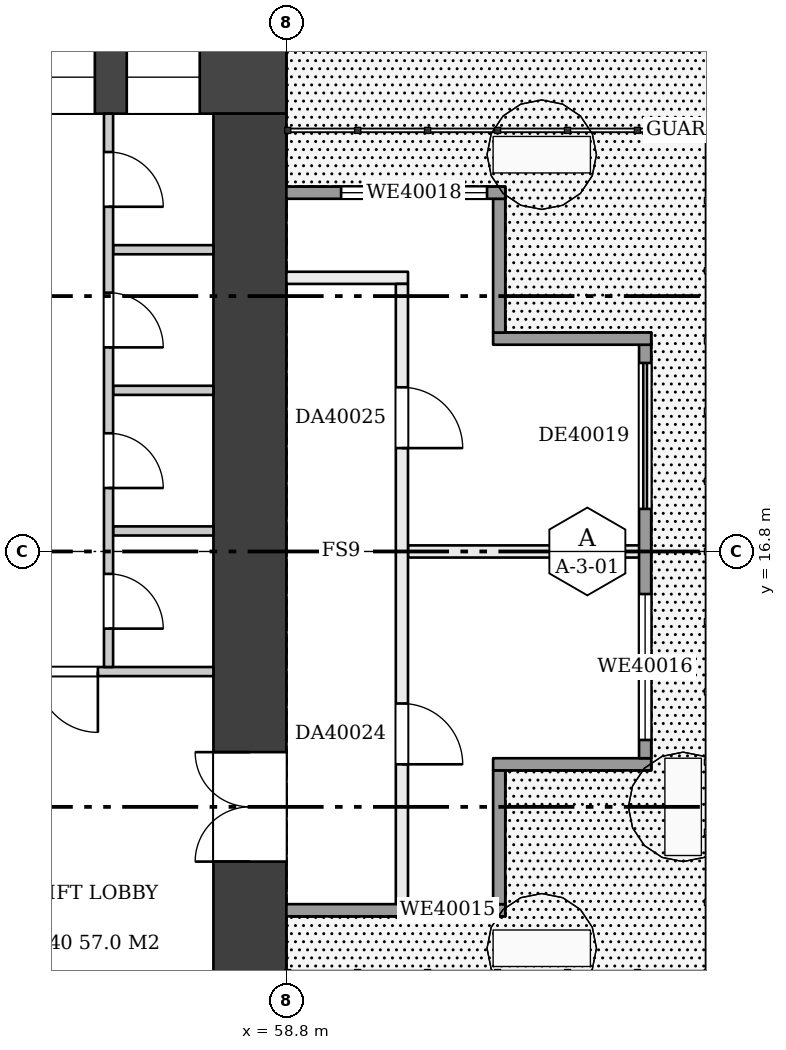
"""IFC4 building model, lengths in metres.
Left out: names, types, materials, properties, quantities, classifications, styles, units other than length and angle.
Written with IfcOpenShell. Run it as: python <this file> out.ifc"""

import sys

from ifc_helpers import new_model, si_unit, direction, frame, frame_2d, origin, place, context, subcontext, project, spatial, rectangle, extrude, element, fill, save


model = new_model("IFC4")
c1 = context("Model", 3, precision=1e-05, world=origin(), true_north=direction((0.0, 1.0)))
c2 = subcontext(c1, "Body", "Model", "MODEL_VIEW")
j1 = project(units=[si_unit("LENGTHUNIT", "METRE"), si_unit("PLANEANGLEUNIT", "RADIAN")], contexts=[c1])
p1 = place(None, origin())
s1 = spatial("IfcSite", under=j1, at=p1, CompositionType="ELEMENT")
p2 = place(p1, origin())
s2 = spatial("IfcBuilding", under=s1, at=p2, CompositionType="ELEMENT")
p3 = place(p2, frame((0.0, 0.0, 158.2)))
s3 = spatial("IfcBuildingStorey", under=s2, at=p3, CompositionType="ELEMENT", Elevation=158.2)
p4 = place(p3, frame((42.0, 24.6, 0.0), z_axis=(0.0, 0.0, 1.0), x_axis=(1.0, 0.0, 0.0)))
e1 = element("IfcWall", 1, at=p4, inside=s3, PredefinedType="SHEAR", context=c2, shape_type="SweptSolid", body=[
    extrude(rectangle(XDim=16.8, YDim=1.2, at=frame_2d((8.4, 0.0))), origin(), (0.0, 0.0, 1.0), 3.22),
])
p5 = place(p4, frame((1.8, 0.0, 0.5)))
e2 = element("IfcOpeningElement", 2, at=p5, cuts=e1, PredefinedType="OPENING", context=c2, shape_type="SweptSolid", body=[
    extrude(rectangle(XDim=1.8, YDim=2.4, at=frame_2d((0.9, 1.2))), frame((0.0, 0.61, 0.0), z_axis=(0.0, -1.0, 0.0), x_axis=(1.0, 0.0, 0.0)), (0.0, 0.0, 1.0), 1.22),
])
p6 = place(p4, frame((4.49, 0.0, 1.6)))
e3 = element("IfcOpeningElement", 3, at=p6, cuts=e1, PredefinedType="OPENING", context=c2, shape_type="SweptSolid", body=[
    extrude(rectangle(XDim=0.9, YDim=1.2, at=frame_2d((0.45, 0.6))), frame((0.0, 0.61, 0.0), z_axis=(0.0, -1.0, 0.0), x_axis=(1.0, 0.0, 0.0)), (0.0, 0.0, 1.0), 1.22),
])
p7 = place(p4, frame((5.71, 0.0, 1.6)))
e4 = element("IfcOpeningElement", 4, at=p7, cuts=e1, PredefinedType="OPENING", context=c2, shape_type="SweptSolid", body=[
    extrude(rectangle(XDim=1.1, YDim=1.2, at=frame_2d((0.55, 0.6))), frame((0.0, 0.61, 0.0), z_axis=(0.0, -1.0, 0.0), x_axis=(1.0, 0.0, 0.0)), (0.0, 0.0, 1.0), 1.22),
])
p8 = place(p4, frame((7.15, 0.0, 1.6)))
e5 = element("IfcOpeningElement", 5, at=p8, cuts=e1, PredefinedType="OPENING", context=c2, shape_type="SweptSolid", body=[
    extrude(rectangle(XDim=1.1, YDim=1.2, at=frame_2d((0.55, 0.6))), frame((0.0, 0.61, 0.0), z_axis=(0.0, -1.0, 0.0), x_axis=(1.0, 0.0, 0.0)), (0.0, 0.0, 1.0), 1.22),
])
p9 = place(p4, frame((12.65, 0.0, 0.6)))
e6 = element("IfcOpeningElement", 6, at=p9, cuts=e1, PredefinedType="OPENING", context=c2, shape_type="SweptSolid", body=[
    extrude(rectangle(XDim=1.0, YDim=2.1, at=frame_2d((0.5, 1.05))), frame((0.0, 0.61, 0.0), z_axis=(0.0, -1.0, 0.0), x_axis=(1.0, 0.0, 0.0)), (0.0, 0.0, 1.0), 1.22),
])
p10 = place(p4, frame((14.175, 0.0, 1.6)))
e7 = element("IfcOpeningElement", 7, at=p10, cuts=e1, PredefinedType="OPENING", context=c2, shape_type="SweptSolid", body=[
    extrude(rectangle(XDim=1.2, YDim=1.2, at=frame_2d((0.6, 0.6))), frame((0.0, 0.61, 0.0), z_axis=(0.0, -1.0, 0.0), x_axis=(1.0, 0.0, 0.0)), (0.0, 0.0, 1.0), 1.22),
])
p11 = place(p3, frame((58.2, 9.6, 0.0), z_axis=(0.0, 0.0, 1.0), x_axis=(0.0, 1.0, 0.0)))
e8 = element("IfcWall", 8, at=p11, inside=s3, PredefinedType="SHEAR", context=c2, shape_type="SweptSolid", body=[
    extrude(rectangle(XDim=14.4, YDim=1.2, at=frame_2d((7.2, 0.0))), origin(), (0.0, 0.0, 1.0), 3.22),
])
p12 = place(p11, frame((2.1, 0.0, 0.0)))
e9 = element("IfcOpeningElement", 9, at=p12, cuts=e8, PredefinedType="OPENING", context=c2, shape_type="SweptSolid", body=[
    extrude(rectangle(XDim=1.8, YDim=2.1, at=frame_2d((0.9, 1.05))), frame((0.0, 0.61, 0.0), z_axis=(0.0, -1.0, 0.0), x_axis=(1.0, 0.0, 0.0)), (0.0, 0.0, 1.0), 1.22),
])
p13 = place(p3, frame((54.6, 14.825, 0.0), z_axis=(0.0, 0.0, 1.0), x_axis=(1.0, 0.0, 0.0)))
e10 = element("IfcWall", 10, at=p13, inside=s3, PredefinedType="PARTITIONING", context=c2, shape_type="SweptSolid", body=[
    extrude(rectangle(XDim=3.0, YDim=0.15, at=frame_2d((1.5, 0.0))), origin(), (0.0, 0.0, 1.0), 3.22),
])
p14 = place(p13, frame((0.1, 0.0, 0.0)))
e11 = element("IfcOpeningElement", 11, at=p14, cuts=e10, PredefinedType="OPENING", context=c2, shape_type="SweptSolid", body=[
    extrude(rectangle(XDim=1.0, YDim=2.1, at=frame_2d((0.5, 1.05))), frame((0.0, 0.085, 0.0), z_axis=(0.0, -1.0, 0.0), x_axis=(1.0, 0.0, 0.0)), (0.0, 0.0, 1.0), 0.17),
])
for number, where, z_axis, x_axis in (
    (12, (55.95, 17.137, 0.0), (0.0, 0.0, 1.0), (1.0, 0.0, 0.0)),
    (13, (55.95, 19.45, 0.0), (0.0, 0.0, 1.0), (1.0, 0.0, 0.0)),
    (14, (55.95, 21.762, 0.0), (0.0, 0.0, 1.0), (1.0, 0.0, 0.0)),
):
    element("IfcWall", number, at=place(p3, frame(where, z_axis=z_axis, x_axis=x_axis)), inside=s3, PredefinedType="PARTITIONING", context=c2, shape_type="SweptSolid", body=[
        extrude(rectangle(XDim=1.65, YDim=0.15, at=frame_2d((0.825, 0.0))), origin(), (0.0, 0.0, 1.0), 3.22),
    ])
p15 = place(p3, frame((55.875, 14.9, 0.0), z_axis=(0.0, 0.0, 1.0), x_axis=(0.0, 1.0, 0.0)))
e15 = element("IfcWall", 15, at=p15, inside=s3, PredefinedType="PARTITIONING", context=c2, shape_type="SweptSolid", body=[
    extrude(rectangle(XDim=9.1, YDim=0.15, at=frame_2d((4.55, 0.0))), origin(), (0.0, 0.0, 1.0), 3.22),
])
p16 = place(p15, frame((0.631, 0.0, 0.0)))
e16 = element("IfcOpeningElement", 16, at=p16, cuts=e15, PredefinedType="OPENING", context=c2, shape_type="SweptSolid", body=[
    extrude(rectangle(XDim=0.9, YDim=2.1, at=frame_2d((0.45, 1.05))), frame((0.0, 0.085, 0.0), z_axis=(0.0, -1.0, 0.0), x_axis=(1.0, 0.0, 0.0)), (0.0, 0.0, 1.0), 0.17),
])
p17 = place(p15, frame((2.944, 0.0, 0.0)))
e17 = element("IfcOpeningElement", 17, at=p17, cuts=e15, PredefinedType="OPENING", context=c2, shape_type="SweptSolid", body=[
    extrude(rectangle(XDim=0.9, YDim=2.1, at=frame_2d((0.45, 1.05))), frame((0.0, 0.085, 0.0), z_axis=(0.0, -1.0, 0.0), x_axis=(1.0, 0.0, 0.0)), (0.0, 0.0, 1.0), 0.17),
])
p18 = place(p15, frame((5.256, 0.0, 0.0)))
e18 = element("IfcOpeningElement", 18, at=p18, cuts=e15, PredefinedType="OPENING", context=c2, shape_type="SweptSolid", body=[
    extrude(rectangle(XDim=0.9, YDim=2.1, at=frame_2d((0.45, 1.05))), frame((0.0, 0.085, 0.0), z_axis=(0.0, -1.0, 0.0), x_axis=(1.0, 0.0, 0.0)), (0.0, 0.0, 1.0), 0.17),
])
p19 = place(p15, frame((7.569, 0.0, 0.0)))
e19 = element("IfcOpeningElement", 19, at=p19, cuts=e15, PredefinedType="OPENING", context=c2, shape_type="SweptSolid", body=[
    extrude(rectangle(XDim=0.9, YDim=2.1, at=frame_2d((0.45, 1.05))), frame((0.0, 0.085, 0.0), z_axis=(0.0, -1.0, 0.0), x_axis=(1.0, 0.0, 0.0)), (0.0, 0.0, 1.0), 0.17),
])
p20 = place(p3, frame((60.8, 16.8, 0.0), z_axis=(0.0, 0.0, 1.0), x_axis=(1.0, 0.0, 0.0)))
e20 = element("IfcWall", 20, at=p20, inside=s3, PredefinedType="PARTITIONING", context=c2, shape_type="SweptSolid", body=[
    extrude(rectangle(XDim=3.9, YDim=0.2, at=frame_2d((1.95, 0.0))), origin(), (0.0, 0.0, 1.0), 3.22),
])
p21 = place(p3, frame((58.8, 21.3, 0.0), z_axis=(0.0, 0.0, 1.0), x_axis=(1.0, 0.0, 0.0)))
e21 = element("IfcWall", 21, at=p21, inside=s3, PredefinedType="PARTITIONING", context=c2, shape_type="SweptSolid", body=[
    extrude(rectangle(XDim=2.0, YDim=0.2, at=frame_2d((1.0, 0.0))), origin(), (0.0, 0.0, 1.0), 3.22),
])
p22 = place(p3, frame((60.7, 10.9, 0.0), z_axis=(0.0, 0.0, 1.0), x_axis=(0.0, 1.0, 0.0)))
e22 = element("IfcWall", 22, at=p22, inside=s3, PredefinedType="PARTITIONING", context=c2, shape_type="SweptSolid", body=[
    extrude(rectangle(XDim=10.3, YDim=0.2, at=frame_2d((5.15, 0.0))), origin(), (0.0, 0.0, 1.0), 3.22),
])
p23 = place(p22, frame((2.4, 0.0, 0.0)))
e23 = element("IfcOpeningElement", 23, at=p23, cuts=e22, PredefinedType="OPENING", context=c2, shape_type="SweptSolid", body=[
    extrude(rectangle(XDim=1.0, YDim=2.1, at=frame_2d((0.5, 1.05))), frame((0.0, 0.11, 0.0), z_axis=(0.0, -1.0, 0.0), x_axis=(1.0, 0.0, 0.0)), (0.0, 0.0, 1.0), 0.22),
])
p24 = place(p22, frame((7.6, 0.0, 0.0)))
e24 = element("IfcOpeningElement", 24, at=p24, cuts=e22, PredefinedType="OPENING", context=c2, shape_type="SweptSolid", body=[
    extrude(rectangle(XDim=1.0, YDim=2.1, at=frame_2d((0.5, 1.05))), frame((0.0, 0.11, 0.0), z_axis=(0.0, -1.0, 0.0), x_axis=(1.0, 0.0, 0.0)), (0.0, 0.0, 1.0), 0.22),
])
p25 = place(p3, frame((58.8, 10.9, 0.0), z_axis=(0.0, 0.0, 1.0), x_axis=(1.0, 0.0, 0.0)))
e25 = element("IfcWall", 25, at=p25, inside=s3, PredefinedType="SOLIDWALL", context=c2, shape_type="SweptSolid", body=[
    extrude(rectangle(XDim=3.6, YDim=0.2, at=frame_2d((1.8, 0.0))), origin(), (0.0, 0.0, 1.0), 3.22),
])
p26 = place(p25, frame((2.0, 0.0, 0.9)))
e26 = element("IfcOpeningElement", 26, at=p26, cuts=e25, PredefinedType="OPENING", context=c2, shape_type="SweptSolid", body=[
    extrude(rectangle(XDim=1.3, YDim=1.5, at=frame_2d((0.65, 0.75))), frame((0.0, 0.11, 0.0), z_axis=(0.0, -1.0, 0.0), x_axis=(1.0, 0.0, 0.0)), (0.0, 0.0, 1.0), 0.22),
])
p27 = place(p3, frame((62.3, 11.0, 0.0), z_axis=(0.0, 0.0, 1.0), x_axis=(0.0, 1.0, 0.0)))
e27 = element("IfcWall", 27, at=p27, inside=s3, PredefinedType="SOLIDWALL", context=c2, shape_type="SweptSolid", body=[
    extrude(rectangle(XDim=2.2, YDim=0.2, at=frame_2d((1.1, 0.0))), origin(), (0.0, 0.0, 1.0), 3.22),
])
p28 = place(p3, frame((62.2, 13.3, 0.0), z_axis=(0.0, 0.0, 1.0), x_axis=(1.0, 0.0, 0.0)))
e28 = element("IfcWall", 28, at=p28, inside=s3, PredefinedType="SOLIDWALL", context=c2, shape_type="SweptSolid", body=[
    extrude(rectangle(XDim=2.6, YDim=0.2, at=frame_2d((1.3, 0.0))), origin(), (0.0, 0.0, 1.0), 3.22),
])
p29 = place(p3, frame((64.7, 13.4, 0.0), z_axis=(0.0, 0.0, 1.0), x_axis=(0.0, 1.0, 0.0)))
e29 = element("IfcWall", 29, at=p29, inside=s3, PredefinedType="SOLIDWALL", context=c2, shape_type="SweptSolid", body=[
    extrude(rectangle(XDim=6.8, YDim=0.2, at=frame_2d((3.4, 0.0))), origin(), (0.0, 0.0, 1.0), 3.22),
])
p30 = place(p29, frame((0.3, 0.0, 0.9)))
e30 = element("IfcOpeningElement", 30, at=p30, cuts=e29, PredefinedType="OPENING", context=c2, shape_type="SweptSolid", body=[
    extrude(rectangle(XDim=2.4, YDim=1.5, at=frame_2d((1.2, 0.75))), frame((0.0, 0.11, 0.0), z_axis=(0.0, -1.0, 0.0), x_axis=(1.0, 0.0, 0.0)), (0.0, 0.0, 1.0), 0.22),
])
p31 = place(p29, frame((4.1, 0.0, 0.0)))
e31 = element("IfcOpeningElement", 31, at=p31, cuts=e29, PredefinedType="OPENING", context=c2, shape_type="SweptSolid", body=[
    extrude(rectangle(XDim=2.4, YDim=2.2, at=frame_2d((1.2, 1.1))), frame((0.0, 0.11, 0.0), z_axis=(0.0, -1.0, 0.0), x_axis=(1.0, 0.0, 0.0)), (0.0, 0.0, 1.0), 0.22),
])
p32 = place(p3, frame((64.8, 20.3, 0.0), z_axis=(0.0, 0.0, 1.0), x_axis=(-1.0, 0.0, 0.0)))
e32 = element("IfcWall", 32, at=p32, inside=s3, PredefinedType="SOLIDWALL", context=c2, shape_type="SweptSolid", body=[
    extrude(rectangle(XDim=2.6, YDim=0.2, at=frame_2d((1.3, 0.0))), origin(), (0.0, 0.0, 1.0), 3.22),
])
p33 = place(p3, frame((62.3, 20.4, 0.0), z_axis=(0.0, 0.0, 1.0), x_axis=(0.0, 1.0, 0.0)))
e33 = element("IfcWall", 33, at=p33, inside=s3, PredefinedType="SOLIDWALL", context=c2, shape_type="SweptSolid", body=[
    extrude(rectangle(XDim=2.2, YDim=0.2, at=frame_2d((1.1, 0.0))), origin(), (0.0, 0.0, 1.0), 3.22),
])
p34 = place(p3, frame((62.4, 22.7, 0.0), z_axis=(0.0, 0.0, 1.0), x_axis=(-1.0, 0.0, 0.0)))
e34 = element("IfcWall", 34, at=p34, inside=s3, PredefinedType="SOLIDWALL", context=c2, shape_type="SweptSolid", body=[
    extrude(rectangle(XDim=3.6, YDim=0.2, at=frame_2d((1.8, 0.0))), origin(), (0.0, 0.0, 1.0), 3.22),
])
p35 = place(p34, frame((0.3, 0.0, 0.9)))
e35 = element("IfcOpeningElement", 35, at=p35, cuts=e34, PredefinedType="OPENING", context=c2, shape_type="SweptSolid", body=[
    extrude(rectangle(XDim=2.4, YDim=1.5, at=frame_2d((1.2, 0.75))), frame((0.0, 0.11, 0.0), z_axis=(0.0, -1.0, 0.0), x_axis=(1.0, 0.0, 0.0)), (0.0, 0.0, 1.0), 0.22),
])
p36 = place(p12, origin())
e36 = element("IfcDoor", 36, at=p36, inside=s3, OperationType="DOUBLE_DOOR_SINGLE_SWING", PredefinedType="DOOR", context=c2, shape_type="SweptSolid", body=[
    extrude(rectangle(XDim=1.8, YDim=2.1, at=frame_2d((0.9, 1.05))), frame((0.0, 0.025, 0.0), z_axis=(0.0, -1.0, 0.0), x_axis=(1.0, 0.0, 0.0)), (0.0, 0.0, 1.0), 0.05),
])
fill(e9, e36)
p37 = place(p14, frame((1.0, 0.0, 0.0), z_axis=(0.0, 0.0, 1.0), x_axis=(-1.0, 0.0, 0.0)))
e37 = element("IfcDoor", 37, at=p37, inside=s3, OperationType="SINGLE_SWING_LEFT", PredefinedType="DOOR", context=c2, shape_type="SweptSolid", body=[
    extrude(rectangle(XDim=1.0, YDim=2.1, at=frame_2d((0.5, 1.05))), frame((0.0, 0.025, 0.0), z_axis=(0.0, -1.0, 0.0), x_axis=(1.0, 0.0, 0.0)), (0.0, 0.0, 1.0), 0.05),
])
fill(e11, e37)
p38 = place(p16, frame((0.9, 0.0, 0.0), z_axis=(0.0, 0.0, 1.0), x_axis=(-1.0, 0.0, 0.0)))
e38 = element("IfcDoor", 38, at=p38, inside=s3, OperationType="SINGLE_SWING_RIGHT", PredefinedType="DOOR", context=c2, shape_type="SweptSolid", body=[
    extrude(rectangle(XDim=0.9, YDim=2.1, at=frame_2d((0.45, 1.05))), frame((0.0, 0.025, 0.0), z_axis=(0.0, -1.0, 0.0), x_axis=(1.0, 0.0, 0.0)), (0.0, 0.0, 1.0), 0.05),
])
fill(e16, e38)
p39 = place(p17, frame((0.9, 0.0, 0.0), z_axis=(0.0, 0.0, 1.0), x_axis=(-1.0, 0.0, 0.0)))
e39 = element("IfcDoor", 39, at=p39, inside=s3, OperationType="SINGLE_SWING_RIGHT", PredefinedType="DOOR", context=c2, shape_type="SweptSolid", body=[
    extrude(rectangle(XDim=0.9, YDim=2.1, at=frame_2d((0.45, 1.05))), frame((0.0, 0.025, 0.0), z_axis=(0.0, -1.0, 0.0), x_axis=(1.0, 0.0, 0.0)), (0.0, 0.0, 1.0), 0.05),
])
fill(e17, e39)
p40 = place(p18, frame((0.9, 0.0, 0.0), z_axis=(0.0, 0.0, 1.0), x_axis=(-1.0, 0.0, 0.0)))
e40 = element("IfcDoor", 40, at=p40, inside=s3, OperationType="SINGLE_SWING_RIGHT", PredefinedType="DOOR", context=c2, shape_type="SweptSolid", body=[
    extrude(rectangle(XDim=0.9, YDim=2.1, at=frame_2d((0.45, 1.05))), frame((0.0, 0.025, 0.0), z_axis=(0.0, -1.0, 0.0), x_axis=(1.0, 0.0, 0.0)), (0.0, 0.0, 1.0), 0.05),
])
fill(e18, e40)
p41 = place(p19, frame((0.9, 0.0, 0.0), z_axis=(0.0, 0.0, 1.0), x_axis=(-1.0, 0.0, 0.0)))
e41 = element("IfcDoor", 41, at=p41, inside=s3, OperationType="SINGLE_SWING_RIGHT", PredefinedType="DOOR", context=c2, shape_type="SweptSolid", body=[
    extrude(rectangle(XDim=0.9, YDim=2.1, at=frame_2d((0.45, 1.05))), frame((0.0, 0.025, 0.0), z_axis=(0.0, -1.0, 0.0), x_axis=(1.0, 0.0, 0.0)), (0.0, 0.0, 1.0), 0.05),
])
fill(e19, e41)
p42 = place(p9, origin())
e42 = element("IfcWindow", 42, at=p42, inside=s3, PartitioningType="SINGLE_PANEL", PredefinedType="WINDOW", context=c2, shape_type="SweptSolid", body=[
    extrude(rectangle(XDim=1.0, YDim=2.1, at=frame_2d((0.5, 1.05))), frame((0.0, 0.03, 0.0), z_axis=(0.0, -1.0, 0.0), x_axis=(1.0, 0.0, 0.0)), (0.0, 0.0, 1.0), 0.06),
])
fill(e6, e42)
p43 = place(p10, origin())
e43 = element("IfcWindow", 43, at=p43, inside=s3, PartitioningType="SINGLE_PANEL", PredefinedType="WINDOW", context=c2, shape_type="SweptSolid", body=[
    extrude(rectangle(XDim=1.2, YDim=1.2, at=frame_2d((0.6, 0.6))), frame((0.0, 0.03, 0.0), z_axis=(0.0, -1.0, 0.0), x_axis=(1.0, 0.0, 0.0)), (0.0, 0.0, 1.0), 0.06),
])
fill(e7, e43)
p44 = place(p23, frame((1.0, 0.0, 0.0), z_axis=(0.0, 0.0, 1.0), x_axis=(-1.0, 0.0, 0.0)))
e44 = element("IfcDoor", 44, at=p44, inside=s3, OperationType="SINGLE_SWING_RIGHT", PredefinedType="DOOR", context=c2, shape_type="SweptSolid", body=[
    extrude(rectangle(XDim=1.0, YDim=2.1, at=frame_2d((0.5, 1.05))), frame((0.0, 0.025, 0.0), z_axis=(0.0, -1.0, 0.0), x_axis=(1.0, 0.0, 0.0)), (0.0, 0.0, 1.0), 0.05),
])
fill(e23, e44)
p45 = place(p24, frame((1.0, 0.0, 0.0), z_axis=(0.0, 0.0, 1.0), x_axis=(-1.0, 0.0, 0.0)))
e45 = element("IfcDoor", 45, at=p45, inside=s3, OperationType="SINGLE_SWING_RIGHT", PredefinedType="DOOR", context=c2, shape_type="SweptSolid", body=[
    extrude(rectangle(XDim=1.0, YDim=2.1, at=frame_2d((0.5, 1.05))), frame((0.0, 0.025, 0.0), z_axis=(0.0, -1.0, 0.0), x_axis=(1.0, 0.0, 0.0)), (0.0, 0.0, 1.0), 0.05),
])
fill(e24, e45)
p46 = place(p26, origin())
e46 = element("IfcWindow", 46, at=p46, inside=s3, PartitioningType="SINGLE_PANEL", PredefinedType="WINDOW", context=c2, shape_type="SweptSolid", body=[
    extrude(rectangle(XDim=1.3, YDim=1.5, at=frame_2d((0.65, 0.75))), frame((0.0, 0.03, 0.0), z_axis=(0.0, -1.0, 0.0), x_axis=(1.0, 0.0, 0.0)), (0.0, 0.0, 1.0), 0.06),
])
fill(e26, e46)
p47 = place(p30, origin())
e47 = element("IfcWindow", 47, at=p47, inside=s3, PartitioningType="SINGLE_PANEL", PredefinedType="WINDOW", context=c2, shape_type="SweptSolid", body=[
    extrude(rectangle(XDim=2.4, YDim=1.5, at=frame_2d((1.2, 0.75))), frame((0.0, 0.03, 0.0), z_axis=(0.0, -1.0, 0.0), x_axis=(1.0, 0.0, 0.0)), (0.0, 0.0, 1.0), 0.06),
])
fill(e30, e47)
p48 = place(p35, origin())
e48 = element("IfcWindow", 48, at=p48, inside=s3, PartitioningType="SINGLE_PANEL", PredefinedType="WINDOW", context=c2, shape_type="SweptSolid", body=[
    extrude(rectangle(XDim=2.4, YDim=1.5, at=frame_2d((1.2, 0.75))), frame((0.0, 0.03, 0.0), z_axis=(0.0, -1.0, 0.0), x_axis=(1.0, 0.0, 0.0)), (0.0, 0.0, 1.0), 0.06),
])
fill(e35, e48)
p49 = place(p31, origin())
e49 = element("IfcDoor", 49, at=p49, inside=s3, OperationType="DOUBLE_DOOR_SLIDING", PredefinedType="DOOR", context=c2, shape_type="SweptSolid", body=[
    extrude(rectangle(XDim=2.4, YDim=2.2, at=frame_2d((1.2, 1.1))), frame((0.0, 0.025, 0.0), z_axis=(0.0, -1.0, 0.0), x_axis=(1.0, 0.0, 0.0)), (0.0, 0.0, 1.0), 0.05),
])
fill(e31, e49)
save(model, sys.argv[1])
